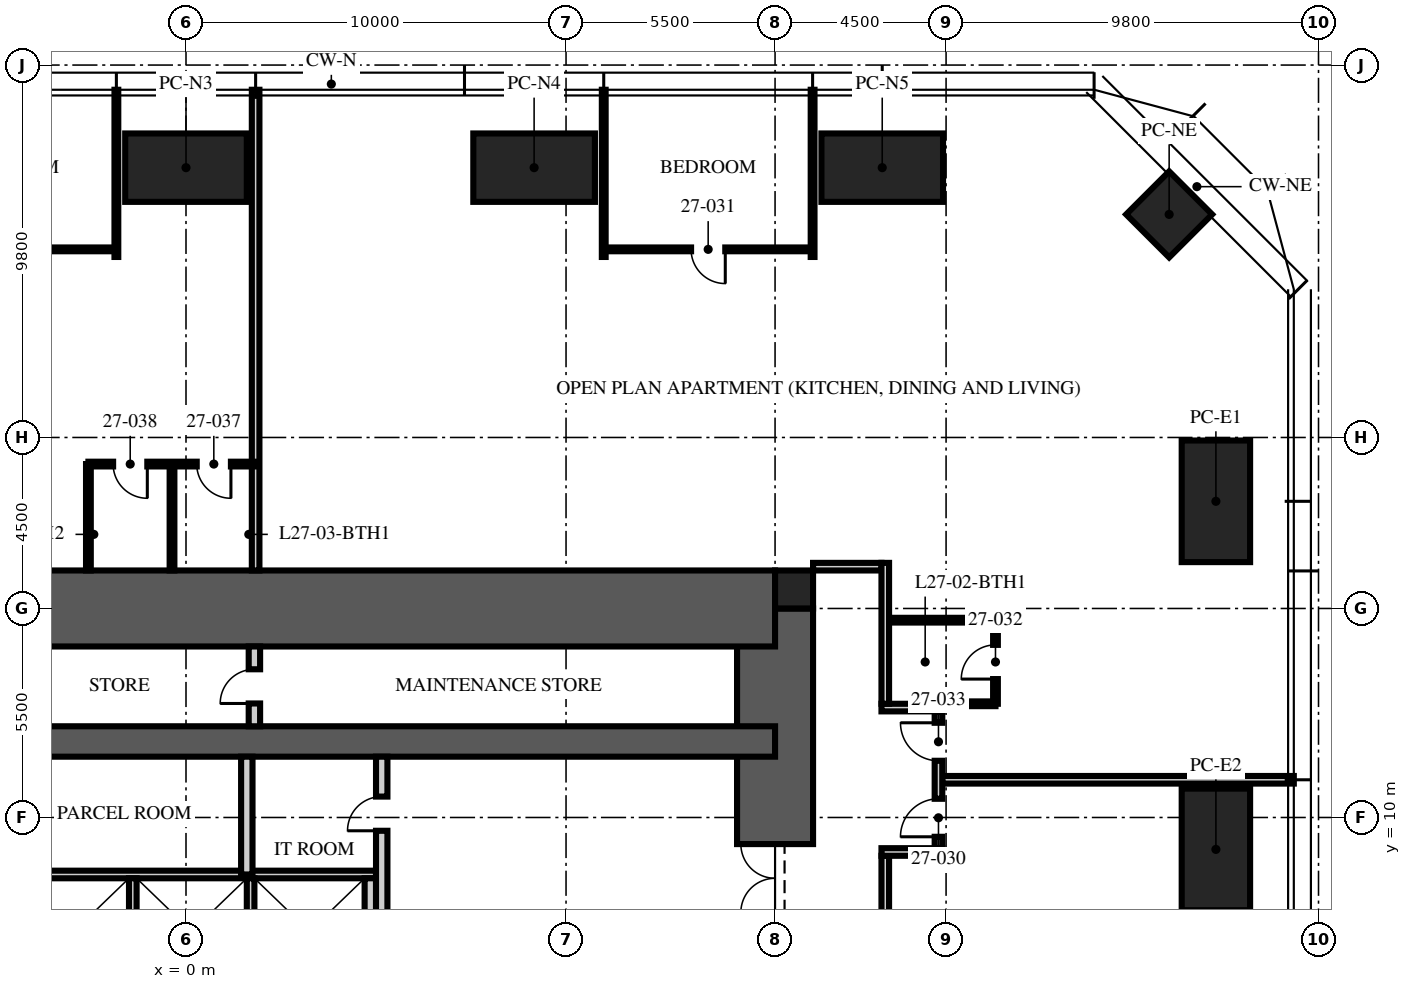
"""IFC4 building model, lengths in metres.
Left out: names, types, materials, properties, quantities, classifications, styles, units other than length and angle.
Written with IfcOpenShell. Run it as: python <this file> out.ifc"""

import sys

from ifc_helpers import new_model, si_unit, direction, frame, frame_2d, origin, origin_2d, place, context, subcontext, project, spatial, rectangle, hollow_rectangle, extrude, element, fill, save


model = new_model("IFC4")
c1 = context("Model", 3, precision=1e-05, world=origin(), true_north=direction((0.0, 1.0)))
c2 = subcontext(c1, "Body", "Model", "MODEL_VIEW")
j1 = project(units=[si_unit("LENGTHUNIT", "METRE"), si_unit("PLANEANGLEUNIT", "RADIAN")], contexts=[c1])
p1 = place(None, origin())
s1 = spatial("IfcSite", under=j1, at=p1, CompositionType="ELEMENT")
p2 = place(p1, origin())
s2 = spatial("IfcBuilding", under=s1, at=p2, CompositionType="ELEMENT")
p3 = place(p2, frame((0.0, 0.0, 111.0)))
s3 = spatial("IfcBuildingStorey", under=s2, at=p3, CompositionType="ELEMENT", Elevation=111.0)
p4 = place(p3, frame((15.5, -15.5, -0.25), z_axis=(0.0, 0.0, 1.0), x_axis=(0.0, 1.0, 0.0)))
e1 = element("IfcWall", 1, at=p4, inside=s3, PredefinedType="SHEAR", context=c2, shape_type="SweptSolid", body=[
    extrude(rectangle(XDim=31.0, YDim=2.0, at=frame_2d((15.5, 0.0))), origin(), (0.0, 0.0, 1.0), 3.75),
])
p5 = place(p4, frame((6.5, 0.0, 0.25)))
e2 = element("IfcOpeningElement", 2, at=p5, cuts=e1, PredefinedType="OPENING", context=c2, shape_type="SweptSolid", body=[
    extrude(rectangle(XDim=1.2, YDim=2.1, at=frame_2d((0.6, 1.05))), frame((0.0, 1.01, 0.0), z_axis=(0.0, -1.0, 0.0), x_axis=(1.0, 0.0, 0.0)), (0.0, 0.0, 1.0), 2.02),
])
p6 = place(p4, frame((23.0, 0.0, 0.25)))
e3 = element("IfcOpeningElement", 3, at=p6, cuts=e1, PredefinedType="OPENING", context=c2, shape_type="SweptSolid", body=[
    extrude(rectangle(XDim=1.8, YDim=2.1, at=frame_2d((0.9, 1.05))), frame((0.0, 1.01, 0.0), z_axis=(0.0, -1.0, 0.0), x_axis=(1.0, 0.0, 0.0)), (0.0, 0.0, 1.0), 2.02),
])
p7 = place(p3, frame((-15.5, 15.5, -0.25), z_axis=(0.0, 0.0, 1.0), x_axis=(1.0, 0.0, 0.0)))
e4 = element("IfcWall", 4, at=p7, inside=s3, PredefinedType="SHEAR", context=c2, shape_type="SweptSolid", body=[
    extrude(rectangle(XDim=31.0, YDim=2.0, at=frame_2d((15.5, 0.0))), origin(), (0.0, 0.0, 1.0), 3.75),
])
p8 = place(p7, frame((5.0, 0.0, 0.25)))
e5 = element("IfcOpeningElement", 5, at=p8, cuts=e4, PredefinedType="OPENING", context=c2, shape_type="SweptSolid", body=[
    extrude(rectangle(XDim=1.0, YDim=2.1, at=frame_2d((0.5, 1.05))), frame((0.0, 1.01, 0.0), z_axis=(0.0, -1.0, 0.0), x_axis=(1.0, 0.0, 0.0)), (0.0, 0.0, 1.0), 2.02),
])
p9 = place(p3, frame((-15.5, 12.0, -0.25), z_axis=(0.0, 0.0, 1.0), x_axis=(1.0, 0.0, 0.0)))
e6 = element("IfcWall", 6, at=p9, inside=s3, PredefinedType="SHEAR", context=c2, shape_type="SweptSolid", body=[
    extrude(rectangle(XDim=31.0, YDim=0.8, at=frame_2d((15.5, 0.0))), origin(), (0.0, 0.0, 1.0), 3.75),
])
p10 = place(p3, frame((16.0, 16.0, -0.25), z_axis=(0.0, 0.0, 1.0), x_axis=(1.0, 0.0, 0.0)))
e7 = element("IfcColumn", 7, at=p10, inside=s3, PredefinedType="COLUMN", context=c2, shape_type="SweptSolid", body=[
    extrude(rectangle(XDim=1.0, YDim=1.0, at=origin_2d()), origin(), (0.0, 0.0, 1.0), 3.75),
])
for number, where, z_axis, x_axis in (
    (8, (0.0, 27.1, 0.0), (0.0, 0.0, 1.0), (1.0, 0.0, 0.0)),
    (9, (9.16, 27.1, 0.0), (0.0, 0.0, 1.0), (1.0, 0.0, 0.0)),
    (10, (18.32, 27.1, 0.0), (0.0, 0.0, 1.0), (1.0, 0.0, 0.0)),
    (11, (27.1, 18.32, 0.0), (0.0, 0.0, 1.0), (0.0, 1.0, 0.0)),
    (12, (27.1, 9.16, 0.0), (0.0, 0.0, 1.0), (0.0, 1.0, 0.0)),
):
    element("IfcColumn", number, at=place(p3, frame(where, z_axis=z_axis, x_axis=x_axis)), inside=s3, PredefinedType="COLUMN", context=c2, shape_type="SweptSolid", body=[
        extrude(hollow_rectangle(XDim=3.2, YDim=1.8, WallThickness=0.2, at=origin_2d()), origin(), (0.0, 0.0, 1.0), 3.75),
    ])
p11 = place(p3, frame((25.87, 25.87, 0.0), z_axis=(0.0, 0.0, 1.0), x_axis=(0.707106781187, -0.707106781187, 0.0)))
e13 = element("IfcColumn", 13, at=p11, inside=s3, PredefinedType="COLUMN", context=c2, shape_type="SweptSolid", body=[
    extrude(hollow_rectangle(XDim=1.6, YDim=1.6, WallThickness=0.1, at=origin_2d()), origin(), (0.0, 0.0, 1.0), 3.75),
])
p12 = place(p3, frame((-4.7, 8.5, 0.0), z_axis=(0.0, 0.0, 1.0), x_axis=(1.0, 0.0, 0.0)))
e14 = element("IfcWall", 14, at=p12, inside=s3, PredefinedType="PARTITIONING", context=c2, shape_type="SweptSolid", body=[
    extrude(rectangle(XDim=9.7, YDim=0.2, at=frame_2d((4.85, 0.0))), origin(), (0.0, 0.0, 1.0), 3.5),
])
p13 = place(p3, frame((4.85, 5.6, 0.0), z_axis=(0.0, 0.0, 1.0), x_axis=(0.0, 1.0, 0.0)))
e15 = element("IfcWall", 15, at=p13, inside=s3, PredefinedType="PARTITIONING", context=c2, shape_type="SweptSolid", body=[
    extrude(rectangle(XDim=2.8, YDim=0.3, at=frame_2d((1.4, 0.0))), origin(), (0.0, 0.0, 1.0), 3.5),
])
for number, where, z_axis, x_axis in (
    (16, (-1.4, 5.6, 0.0), (0.0, 0.0, 1.0), (0.0, 1.0, 0.0)),
    (17, (1.7, 5.6, 0.0), (0.0, 0.0, 1.0), (0.0, 1.0, 0.0)),
):
    element("IfcWall", number, at=place(p3, frame(where, z_axis=z_axis, x_axis=x_axis)), inside=s3, PredefinedType="PARTITIONING", context=c2, shape_type="SweptSolid", body=[
        extrude(rectangle(XDim=2.8, YDim=0.2, at=frame_2d((1.4, 0.0))), origin(), (0.0, 0.0, 1.0), 3.5),
    ])
p14 = place(p3, frame((5.15, 5.3, 0.0), z_axis=(0.0, 0.0, 1.0), x_axis=(0.0, 1.0, 0.0)))
e18 = element("IfcWall", 18, at=p14, inside=s3, PredefinedType="PARTITIONING", context=c2, shape_type="SweptSolid", body=[
    extrude(rectangle(XDim=6.3, YDim=0.3, at=frame_2d((3.15, 0.0))), origin(), (0.0, 0.0, 1.0), 3.5),
])
p15 = place(p14, frame((4.35, 0.0, 0.0)))
e19 = element("IfcOpeningElement", 19, at=p15, cuts=e18, PredefinedType="OPENING", context=c2, shape_type="SweptSolid", body=[
    extrude(rectangle(XDim=0.9, YDim=2.1, at=frame_2d((0.45, 1.05))), frame((0.0, 0.16, 0.0), z_axis=(0.0, -1.0, 0.0), x_axis=(1.0, 0.0, 0.0)), (0.0, 0.0, 1.0), 0.32),
])
p16 = place(p3, frame((1.6, 8.5, 0.0), z_axis=(0.0, 0.0, 1.0), x_axis=(0.0, 1.0, 0.0)))
e20 = element("IfcWall", 20, at=p16, inside=s3, PredefinedType="PARTITIONING", context=c2, shape_type="SweptSolid", body=[
    extrude(rectangle(XDim=3.1, YDim=0.3, at=frame_2d((1.55, 0.0))), origin(), (0.0, 0.0, 1.0), 3.5),
])
p17 = place(p3, frame((1.8, 12.4, 0.0), z_axis=(0.0, 0.0, 1.0), x_axis=(0.0, 1.0, 0.0)))
e21 = element("IfcWall", 21, at=p17, inside=s3, PredefinedType="PARTITIONING", context=c2, shape_type="SweptSolid", body=[
    extrude(rectangle(XDim=2.1, YDim=0.3, at=frame_2d((1.05, 0.0))), origin(), (0.0, 0.0, 1.0), 3.5),
])
p18 = place(p17, frame((0.6, 0.0, 0.0)))
e22 = element("IfcOpeningElement", 22, at=p18, cuts=e21, PredefinedType="OPENING", context=c2, shape_type="SweptSolid", body=[
    extrude(rectangle(XDim=0.9, YDim=2.1, at=frame_2d((0.45, 1.05))), frame((0.0, 0.16, 0.0), z_axis=(0.0, -1.0, 0.0), x_axis=(1.0, 0.0, 0.0)), (0.0, 0.0, 1.0), 0.32),
])
p19 = place(p3, frame((16.5, 16.6, 0.0), z_axis=(0.0, 0.0, 1.0), x_axis=(1.0, 0.0, 0.0)))
e23 = element("IfcWall", 23, at=p19, inside=s3, PredefinedType="PARTITIONING", context=c2, shape_type="SweptSolid", body=[
    extrude(rectangle(XDim=1.8, YDim=0.2, at=frame_2d((0.9, 0.0))), origin(), (0.0, 0.0, 1.0), 2.3),
])
p20 = place(p3, frame((19.9, 10.992, 0.0), z_axis=(0.0, 0.0, 1.0), x_axis=(1.0, 0.0, 0.0)))
e24 = element("IfcWall", 24, at=p20, inside=s3, PredefinedType="PARTITIONING", context=c2, shape_type="SweptSolid", body=[
    extrude(rectangle(XDim=9.25, YDim=0.2, at=frame_2d((4.625, 0.0))), origin(), (0.0, 0.0, 1.0), 2.81),
])
for number, where, z_axis, x_axis in (
    (25, (16.488, 24.75, 0.0), (0.0, 0.0, 1.0), (0.0, 1.0, 0.0)),
    (26, (10.992, 24.75, 0.0), (0.0, 0.0, 1.0), (0.0, 1.0, 0.0)),
):
    element("IfcWall", number, at=place(p3, frame(where, z_axis=z_axis, x_axis=x_axis)), inside=s3, PredefinedType="PARTITIONING", context=c2, shape_type="SweptSolid", body=[
        extrude(rectangle(XDim=4.4, YDim=0.1, at=frame_2d((2.2, 0.0))), origin(), (0.0, 0.0, 1.0), 2.81),
    ])
p21 = place(p3, frame((1.832, 16.5, 0.0), z_axis=(0.0, 0.0, 1.0), x_axis=(0.0, 1.0, 0.0)))
e27 = element("IfcWall", 27, at=p21, inside=s3, PredefinedType="PARTITIONING", context=c2, shape_type="SweptSolid", body=[
    extrude(rectangle(XDim=12.65, YDim=0.2, at=frame_2d((6.325, 0.0))), origin(), (0.0, 0.0, 1.0), 2.81),
])
p22 = place(p3, frame((-1.832, 24.75, 0.0), z_axis=(0.0, 0.0, 1.0), x_axis=(0.0, 1.0, 0.0)))
e28 = element("IfcWall", 28, at=p22, inside=s3, PredefinedType="PARTITIONING", context=c2, shape_type="SweptSolid", body=[
    extrude(rectangle(XDim=4.4, YDim=0.1, at=frame_2d((2.2, 0.0))), origin(), (0.0, 0.0, 1.0), 2.81),
])
p23 = place(p3, frame((16.488, 24.95, 0.0), z_axis=(0.0, 0.0, 1.0), x_axis=(-1.0, 0.0, 0.0)))
e29 = element("IfcWall", 29, at=p23, inside=s3, PredefinedType="PARTITIONING", context=c2, shape_type="SweptSolid", body=[
    extrude(rectangle(XDim=5.496, YDim=0.1, at=frame_2d((2.748, 0.0))), origin(), (0.0, 0.0, 1.0), 2.81),
])
p24 = place(p23, frame((2.298, 0.0, 0.0)))
e30 = element("IfcOpeningElement", 30, at=p24, cuts=e29, PredefinedType="OPENING", context=c2, shape_type="SweptSolid", body=[
    extrude(rectangle(XDim=0.9, YDim=2.1, at=frame_2d((0.45, 1.05))), frame((0.0, 0.06, 0.0), z_axis=(0.0, -1.0, 0.0), x_axis=(1.0, 0.0, 0.0)), (0.0, 0.0, 1.0), 0.12),
])
p25 = place(p3, frame((21.3, 12.992, 0.0), z_axis=(0.0, 0.0, 1.0), x_axis=(0.0, 1.0, 0.0)))
e31 = element("IfcWall", 31, at=p25, inside=s3, PredefinedType="PARTITIONING", context=c2, shape_type="SweptSolid", body=[
    extrude(rectangle(XDim=2.2, YDim=0.125, at=frame_2d((1.1, 0.0))), origin(), (0.0, 0.0, 1.0), 2.81),
])
p26 = place(p25, frame((0.65, 0.0, 0.0)))
e32 = element("IfcOpeningElement", 32, at=p26, cuts=e31, PredefinedType="OPENING", context=c2, shape_type="SweptSolid", body=[
    extrude(rectangle(XDim=0.9, YDim=2.1, at=frame_2d((0.45, 1.05))), frame((0.0, 0.073, 0.0), z_axis=(0.0, -1.0, 0.0), x_axis=(1.0, 0.0, 0.0)), (0.0, 0.0, 1.0), 0.145),
])
p27 = place(p3, frame((19.97, 12.992, 0.0), z_axis=(0.0, 0.0, 1.0), x_axis=(1.0, 0.0, 0.0)))
e33 = element("IfcWall", 33, at=p27, inside=s3, PredefinedType="PARTITIONING", context=c2, shape_type="SweptSolid", body=[
    extrude(rectangle(XDim=1.33, YDim=0.125, at=frame_2d((0.665, 0.0))), origin(), (0.0, 0.0, 1.0), 3.5),
])
p28 = place(p3, frame((18.5, 15.192, 0.0), z_axis=(0.0, 0.0, 1.0), x_axis=(1.0, 0.0, 0.0)))
e34 = element("IfcWall", 34, at=p28, inside=s3, PredefinedType="PARTITIONING", context=c2, shape_type="SweptSolid", body=[
    extrude(rectangle(XDim=2.8, YDim=0.125, at=frame_2d((1.4, 0.0))), origin(), (0.0, 0.0, 1.0), 3.5),
])
p29 = place(p3, frame((-1.832, 24.95, 0.0), z_axis=(0.0, 0.0, 1.0), x_axis=(-1.0, 0.0, 0.0)))
e35 = element("IfcWall", 35, at=p29, inside=s3, PredefinedType="PARTITIONING", context=c2, shape_type="SweptSolid", body=[
    extrude(rectangle(XDim=5.496, YDim=0.1, at=frame_2d((2.748, 0.0))), origin(), (0.0, 0.0, 1.0), 2.81),
])
p30 = place(p29, frame((2.298, 0.0, 0.0)))
e36 = element("IfcOpeningElement", 36, at=p30, cuts=e35, PredefinedType="OPENING", context=c2, shape_type="SweptSolid", body=[
    extrude(rectangle(XDim=0.9, YDim=2.1, at=frame_2d((0.45, 1.05))), frame((0.0, 0.06, 0.0), z_axis=(0.0, -1.0, 0.0), x_axis=(1.0, 0.0, 0.0)), (0.0, 0.0, 1.0), 0.12),
])
p31 = place(p3, frame((1.832, 19.3, 0.0), z_axis=(0.0, 0.0, 1.0), x_axis=(-1.0, 0.0, 0.0)))
e37 = element("IfcWall", 37, at=p31, inside=s3, PredefinedType="PARTITIONING", context=c2, shape_type="SweptSolid", body=[
    extrude(rectangle(XDim=4.4, YDim=0.125, at=frame_2d((2.2, 0.0))), origin(), (0.0, 0.0, 1.0), 2.7),
])
p32 = place(p31, frame((0.65, 0.0, 0.0)))
e38 = element("IfcOpeningElement", 38, at=p32, cuts=e37, PredefinedType="OPENING", context=c2, shape_type="SweptSolid", body=[
    extrude(rectangle(XDim=0.9, YDim=2.1, at=frame_2d((0.45, 1.05))), frame((0.0, 0.073, 0.0), z_axis=(0.0, -1.0, 0.0), x_axis=(1.0, 0.0, 0.0)), (0.0, 0.0, 1.0), 0.145),
])
p33 = place(p31, frame((2.85, 0.0, 0.0)))
e39 = element("IfcOpeningElement", 39, at=p33, cuts=e37, PredefinedType="OPENING", context=c2, shape_type="SweptSolid", body=[
    extrude(rectangle(XDim=0.9, YDim=2.1, at=frame_2d((0.45, 1.05))), frame((0.0, 0.073, 0.0), z_axis=(0.0, -1.0, 0.0), x_axis=(1.0, 0.0, 0.0)), (0.0, 0.0, 1.0), 0.145),
])
for number, where, z_axis, x_axis in (
    (40, (-0.368, 16.5, 0.0), (0.0, 0.0, 1.0), (0.0, 1.0, 0.0)),
    (41, (-2.568, 16.5, 0.0), (0.0, 0.0, 1.0), (0.0, 1.0, 0.0)),
):
    element("IfcWall", number, at=place(p3, frame(where, z_axis=z_axis, x_axis=x_axis)), inside=s3, PredefinedType="PARTITIONING", context=c2, shape_type="SweptSolid", body=[
        extrude(rectangle(XDim=2.8, YDim=0.125, at=frame_2d((1.4, 0.0))), origin(), (0.0, 0.0, 1.0), 3.5),
    ])
p34 = place(p3, frame((18.4, -18.3, 0.0), z_axis=(0.0, 0.0, 1.0), x_axis=(0.0, 1.0, 0.0)))
e42 = element("IfcWall", 42, at=p34, inside=s3, PredefinedType="PARTITIONING", context=c2, shape_type="SweptSolid", body=[
    extrude(rectangle(XDim=27.292, YDim=0.2, at=frame_2d((13.646, 0.0))), origin(), (0.0, 0.0, 1.0), 2.3),
])
p35 = place(p3, frame((18.3, 9.092, 0.0), z_axis=(0.0, 0.0, 1.0), x_axis=(1.0, 0.0, 0.0)))
e43 = element("IfcWall", 43, at=p35, inside=s3, PredefinedType="PARTITIONING", context=c2, shape_type="SweptSolid", body=[
    extrude(rectangle(XDim=1.6, YDim=0.2, at=frame_2d((0.8, 0.0))), origin(), (0.0, 0.0, 1.0), 2.7),
])
p36 = place(p3, frame((18.3, 12.892, 0.0), z_axis=(0.0, 0.0, 1.0), x_axis=(1.0, 0.0, 0.0)))
e44 = element("IfcWall", 44, at=p36, inside=s3, PredefinedType="PARTITIONING", context=c2, shape_type="SweptSolid", body=[
    extrude(rectangle(XDim=1.6, YDim=0.2, at=frame_2d((0.8, 0.0))), origin(), (0.0, 0.0, 1.0), 3.5),
])
p37 = place(p3, frame((19.8, 9.192, 0.0), z_axis=(0.0, 0.0, 1.0), x_axis=(0.0, 1.0, 0.0)))
e45 = element("IfcWall", 45, at=p37, inside=s3, PredefinedType="PARTITIONING", context=c2, shape_type="SweptSolid", body=[
    extrude(rectangle(XDim=3.6, YDim=0.2, at=frame_2d((1.8, 0.0))), origin(), (0.0, 0.0, 1.0), 2.7),
])
p38 = place(p37, frame((0.3, 0.0, 0.0)))
e46 = element("IfcOpeningElement", 46, at=p38, cuts=e45, PredefinedType="OPENING", context=c2, shape_type="SweptSolid", body=[
    extrude(rectangle(XDim=1.0, YDim=2.2, at=frame_2d((0.5, 1.1))), frame((0.0, 0.11, 0.0), z_axis=(0.0, -1.0, 0.0), x_axis=(1.0, 0.0, 0.0)), (0.0, 0.0, 1.0), 0.22),
])
p39 = place(p37, frame((2.3, 0.0, 0.0)))
e47 = element("IfcOpeningElement", 47, at=p39, cuts=e45, PredefinedType="OPENING", context=c2, shape_type="SweptSolid", body=[
    extrude(rectangle(XDim=1.0, YDim=2.2, at=frame_2d((0.5, 1.1))), frame((0.0, 0.11, 0.0), z_axis=(0.0, -1.0, 0.0), x_axis=(1.0, 0.0, 0.0)), (0.0, 0.0, 1.0), 0.22),
])
p40 = place(p3, frame((18.4, 12.992, 0.0), z_axis=(0.0, 0.0, 1.0), x_axis=(0.0, 1.0, 0.0)))
e48 = element("IfcWall", 48, at=p40, inside=s3, PredefinedType="PARTITIONING", context=c2, shape_type="SweptSolid", body=[
    extrude(rectangle(XDim=3.708, YDim=0.2, at=frame_2d((1.854, 0.0))), origin(), (0.0, 0.0, 1.0), 2.81),
])
p41 = place(p6, origin())
e49 = element("IfcDoor", 49, at=p41, inside=s3, OperationType="DOUBLE_DOOR_SINGLE_SWING", PredefinedType="DOOR", context=c2, shape_type="SweptSolid", body=[
    extrude(rectangle(XDim=1.8, YDim=2.1, at=frame_2d((0.9, 1.05))), frame((0.0, 0.025, 0.0), z_axis=(0.0, -1.0, 0.0), x_axis=(1.0, 0.0, 0.0)), (0.0, 0.0, 1.0), 0.05),
])
fill(e3, e49)
p42 = place(p15, origin())
e50 = element("IfcDoor", 50, at=p42, inside=s3, OperationType="SINGLE_SWING_LEFT", PredefinedType="DOOR", context=c2, shape_type="SweptSolid", body=[
    extrude(rectangle(XDim=0.9, YDim=2.1, at=frame_2d((0.45, 1.05))), frame((0.0, 0.025, 0.0), z_axis=(0.0, -1.0, 0.0), x_axis=(1.0, 0.0, 0.0)), (0.0, 0.0, 1.0), 0.05),
])
fill(e19, e50)
p43 = place(p18, origin())
e51 = element("IfcDoor", 51, at=p43, inside=s3, OperationType="SINGLE_SWING_LEFT", PredefinedType="DOOR", context=c2, shape_type="SweptSolid", body=[
    extrude(rectangle(XDim=0.9, YDim=2.1, at=frame_2d((0.45, 1.05))), frame((0.0, 0.025, 0.0), z_axis=(0.0, -1.0, 0.0), x_axis=(1.0, 0.0, 0.0)), (0.0, 0.0, 1.0), 0.05),
])
fill(e22, e51)
p44 = place(p38, origin())
e52 = element("IfcDoor", 52, at=p44, inside=s3, OperationType="SINGLE_SWING_LEFT", PredefinedType="DOOR", context=c2, shape_type="SweptSolid", body=[
    extrude(rectangle(XDim=1.0, YDim=2.2, at=frame_2d((0.5, 1.1))), frame((0.0, 0.025, 0.0), z_axis=(0.0, -1.0, 0.0), x_axis=(1.0, 0.0, 0.0)), (0.0, 0.0, 1.0), 0.05),
])
fill(e46, e52)
p45 = place(p24, origin())
e53 = element("IfcDoor", 53, at=p45, inside=s3, OperationType="SINGLE_SWING_LEFT", PredefinedType="DOOR", context=c2, shape_type="SweptSolid", body=[
    extrude(rectangle(XDim=0.9, YDim=2.1, at=frame_2d((0.45, 1.05))), frame((0.0, 0.025, 0.0), z_axis=(0.0, -1.0, 0.0), x_axis=(1.0, 0.0, 0.0)), (0.0, 0.0, 1.0), 0.05),
])
fill(e30, e53)
p46 = place(p26, origin())
e54 = element("IfcDoor", 54, at=p46, inside=s3, OperationType="SINGLE_SWING_LEFT", PredefinedType="DOOR", context=c2, shape_type="SweptSolid", body=[
    extrude(rectangle(XDim=0.9, YDim=2.1, at=frame_2d((0.45, 1.05))), frame((0.0, 0.025, 0.0), z_axis=(0.0, -1.0, 0.0), x_axis=(1.0, 0.0, 0.0)), (0.0, 0.0, 1.0), 0.05),
])
fill(e32, e54)
p47 = place(p39, origin())
e55 = element("IfcDoor", 55, at=p47, inside=s3, OperationType="SINGLE_SWING_RIGHT", PredefinedType="DOOR", context=c2, shape_type="SweptSolid", body=[
    extrude(rectangle(XDim=1.0, YDim=2.2, at=frame_2d((0.5, 1.1))), frame((0.0, 0.025, 0.0), z_axis=(0.0, -1.0, 0.0), x_axis=(1.0, 0.0, 0.0)), (0.0, 0.0, 1.0), 0.05),
])
fill(e47, e55)
p48 = place(p32, origin())
e56 = element("IfcDoor", 56, at=p48, inside=s3, OperationType="SINGLE_SWING_LEFT", PredefinedType="DOOR", context=c2, shape_type="SweptSolid", body=[
    extrude(rectangle(XDim=0.9, YDim=2.1, at=frame_2d((0.45, 1.05))), frame((0.0, 0.025, 0.0), z_axis=(0.0, -1.0, 0.0), x_axis=(1.0, 0.0, 0.0)), (0.0, 0.0, 1.0), 0.05),
])
fill(e38, e56)
p49 = place(p33, origin())
e57 = element("IfcDoor", 57, at=p49, inside=s3, OperationType="SINGLE_SWING_LEFT", PredefinedType="DOOR", context=c2, shape_type="SweptSolid", body=[
    extrude(rectangle(XDim=0.9, YDim=2.1, at=frame_2d((0.45, 1.05))), frame((0.0, 0.025, 0.0), z_axis=(0.0, -1.0, 0.0), x_axis=(1.0, 0.0, 0.0)), (0.0, 0.0, 1.0), 0.05),
])
fill(e39, e57)
save(model, sys.argv[1])
